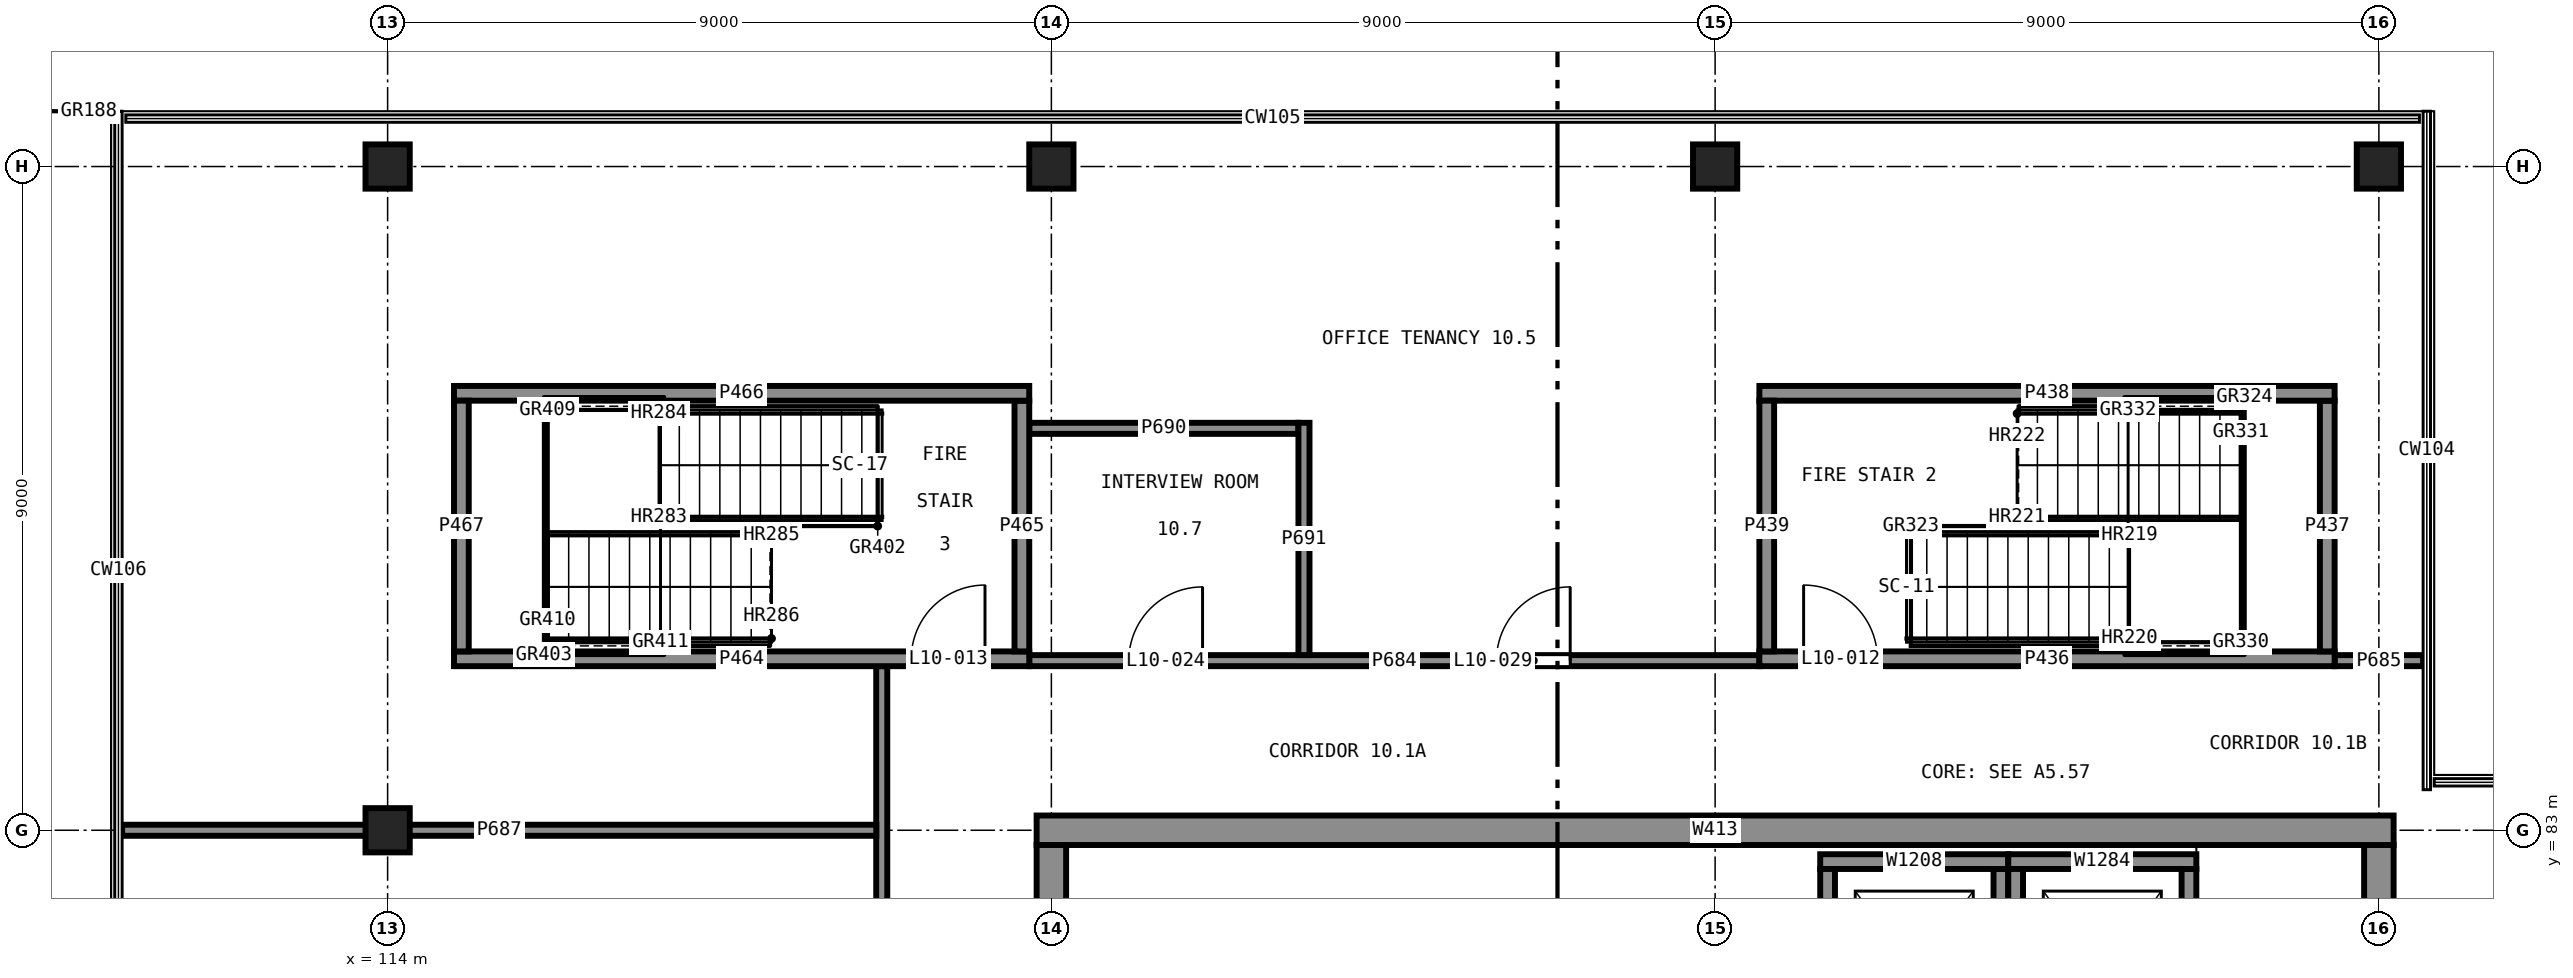
"""IFC4 building model, lengths in metres.
Left out: names, types, materials, properties, quantities, classifications, styles, units other than length and angle.
Written with IfcOpenShell. Run it as: python <this file> out.ifc"""

import sys

from ifc_helpers import new_model, si_unit, direction, frame, frame_2d, origin, origin_2d, place, context, subcontext, project, spatial, rectangle, extrude, element, fill, save


model = new_model("IFC4")
c1 = context("Model", 3, precision=1e-05, world=origin(), true_north=direction((0.0, 1.0)))
c2 = subcontext(c1, "Body", "Model", "MODEL_VIEW")
j1 = project(units=[si_unit("LENGTHUNIT", "METRE"), si_unit("PLANEANGLEUNIT", "RADIAN")], contexts=[c1])
p1 = place(None, origin())
s1 = spatial("IfcSite", under=j1, at=p1, CompositionType="ELEMENT")
p2 = place(p1, origin())
s2 = spatial("IfcBuilding", under=s1, at=p2, CompositionType="ELEMENT")
p3 = place(p2, frame((0.0, 0.0, 41.5)))
s3 = spatial("IfcBuildingStorey", under=s2, at=p3, CompositionType="ELEMENT", Elevation=41.5)
for number, where, z_axis, x_axis in (
    (1, (114.0, 83.0, 0.0), (0.0, 0.0, 1.0), (1.0, 0.0, 0.0)),
    (2, (114.0, 92.0, 0.0), (0.0, 0.0, 1.0), (1.0, 0.0, 0.0)),
    (3, (123.0, 92.0, 0.0), (0.0, 0.0, 1.0), (1.0, 0.0, 0.0)),
    (4, (132.0, 92.0, 0.0), (0.0, 0.0, 1.0), (1.0, 0.0, 0.0)),
    (5, (141.0, 92.0, 0.0), (0.0, 0.0, 1.0), (1.0, 0.0, 0.0)),
):
    element("IfcColumn", number, at=place(p3, frame(where, z_axis=z_axis, x_axis=x_axis)), inside=s3, PredefinedType="COLUMN", context=c2, shape_type="SweptSolid", body=[
        extrude(rectangle(XDim=0.6, YDim=0.6, at=origin_2d()), origin(), (0.0, 0.0, 1.0), 4.0),
    ])
p4 = place(p3, frame((141.0, 65.2, 0.0), z_axis=(0.0, 0.0, 1.0), x_axis=(0.0, 1.0, 0.0)))
e6 = element("IfcWall", 6, at=p4, inside=s3, PredefinedType="SHEAR", context=c2, shape_type="SweptSolid", body=[
    extrude(rectangle(XDim=17.6, YDim=0.4, at=frame_2d((8.8, 0.0))), origin(), (0.0, 0.0, 1.0), 4.0),
])
p5 = place(p4, frame((4.325, 0.0, 0.0)))
e7 = element("IfcOpeningElement", 7, at=p5, cuts=e6, PredefinedType="OPENING", context=c2, shape_type="SweptSolid", body=[
    extrude(rectangle(XDim=1.2, YDim=2.1, at=frame_2d((0.6, 1.05))), frame((0.0, 0.21, 0.0), z_axis=(0.0, -1.0, 0.0), x_axis=(1.0, 0.0, 0.0)), (0.0, 0.0, 1.0), 0.42),
])
p6 = place(p4, frame((12.075, 0.0, 0.0)))
e8 = element("IfcOpeningElement", 8, at=p6, cuts=e6, PredefinedType="OPENING", context=c2, shape_type="SweptSolid", body=[
    extrude(rectangle(XDim=1.2, YDim=2.1, at=frame_2d((0.6, 1.05))), frame((0.0, 0.21, 0.0), z_axis=(0.0, -1.0, 0.0), x_axis=(1.0, 0.0, 0.0)), (0.0, 0.0, 1.0), 0.42),
])
p7 = place(p3, frame((141.2, 83.0, 0.0), z_axis=(0.0, 0.0, 1.0), x_axis=(-1.0, 0.0, 0.0)))
e9 = element("IfcWall", 9, at=p7, inside=s3, PredefinedType="SHEAR", context=c2, shape_type="SweptSolid", body=[
    extrude(rectangle(XDim=18.4, YDim=0.4, at=frame_2d((9.2, 0.0))), origin(), (0.0, 0.0, 1.0), 4.0),
])
p8 = place(p3, frame((123.0, 82.8, 0.0), z_axis=(0.0, 0.0, 1.0), x_axis=(0.0, -1.0, 0.0)))
e10 = element("IfcWall", 10, at=p8, inside=s3, PredefinedType="SHEAR", context=c2, shape_type="SweptSolid", body=[
    extrude(rectangle(XDim=17.6, YDim=0.4, at=frame_2d((8.8, 0.0))), origin(), (0.0, 0.0, 1.0), 4.0),
])
p9 = place(p8, frame((12.075, 0.0, 0.0)))
e11 = element("IfcOpeningElement", 11, at=p9, cuts=e10, PredefinedType="OPENING", context=c2, shape_type="SweptSolid", body=[
    extrude(rectangle(XDim=1.2, YDim=2.1, at=frame_2d((0.6, 1.05))), frame((0.0, 0.21, 0.0), z_axis=(0.0, -1.0, 0.0), x_axis=(1.0, 0.0, 0.0)), (0.0, 0.0, 1.0), 0.42),
])
p10 = place(p8, frame((4.325, 0.0, 0.0)))
e12 = element("IfcOpeningElement", 12, at=p10, cuts=e10, PredefinedType="OPENING", context=c2, shape_type="SweptSolid", body=[
    extrude(rectangle(XDim=1.2, YDim=2.1, at=frame_2d((0.6, 1.05))), frame((0.0, 0.21, 0.0), z_axis=(0.0, -1.0, 0.0), x_axis=(1.0, 0.0, 0.0)), (0.0, 0.0, 1.0), 0.42),
])
p11 = place(p3, frame((135.875, 79.675, 0.0), z_axis=(0.0, 0.0, 1.0), x_axis=(0.0, 1.0, 0.0)))
e13 = element("IfcWall", 13, at=p11, inside=s3, PredefinedType="SHEAR", context=c2, shape_type="SweptSolid", body=[
    extrude(rectangle(XDim=2.8, YDim=0.2, at=frame_2d((1.4, 0.0))), origin(), (0.0, 0.0, 1.0), 4.0),
])
p12 = place(p3, frame((135.975, 82.575, 0.0), z_axis=(0.0, 0.0, 1.0), x_axis=(-1.0, 0.0, 0.0)))
e14 = element("IfcWall", 14, at=p12, inside=s3, PredefinedType="SHEAR", context=c2, shape_type="SweptSolid", body=[
    extrude(rectangle(XDim=2.55, YDim=0.2, at=frame_2d((1.275, 0.0))), origin(), (0.0, 0.0, 1.0), 4.0),
])
for number, where, z_axis, x_axis in (
    (15, (133.525, 82.475, 0.0), (0.0, 0.0, 1.0), (0.0, -1.0, 0.0)),
    (16, (138.425, 79.675, 0.0), (0.0, 0.0, 1.0), (0.0, 1.0, 0.0)),
):
    element("IfcWall", number, at=place(p3, frame(where, z_axis=z_axis, x_axis=x_axis)), inside=s3, PredefinedType="SHEAR", context=c2, shape_type="SweptSolid", body=[
        extrude(rectangle(XDim=2.8, YDim=0.2, at=frame_2d((1.4, 0.0))), origin(), (0.0, 0.0, 1.0), 4.0),
    ])
p13 = place(p3, frame((138.525, 82.575, 0.0), z_axis=(0.0, 0.0, 1.0), x_axis=(-1.0, 0.0, 0.0)))
e17 = element("IfcWall", 17, at=p13, inside=s3, PredefinedType="SHEAR", context=c2, shape_type="SweptSolid", body=[
    extrude(rectangle(XDim=2.55, YDim=0.2, at=frame_2d((1.275, 0.0))), origin(), (0.0, 0.0, 1.0), 4.0),
])
p14 = place(p3, frame((136.075, 82.475, 0.0), z_axis=(0.0, 0.0, 1.0), x_axis=(0.0, -1.0, 0.0)))
e18 = element("IfcWall", 18, at=p14, inside=s3, PredefinedType="SHEAR", context=c2, shape_type="SweptSolid", body=[
    extrude(rectangle(XDim=2.8, YDim=0.2, at=frame_2d((1.4, 0.0))), origin(), (0.0, 0.0, 1.0), 4.0),
])
p15 = place(p3, frame((132.6, 85.325, 0.0), z_axis=(0.0, 0.0, 1.0), x_axis=(1.0, 0.0, 0.0)))
e19 = element("IfcWall", 19, at=p15, inside=s3, PredefinedType="SHEAR", context=c2, shape_type="SweptSolid", body=[
    extrude(rectangle(XDim=7.8, YDim=0.2, at=frame_2d((3.9, 0.0))), origin(), (0.0, 0.0, 1.0), 3.75),
])
p16 = place(p15, frame((0.6, 0.0, 0.0)))
e20 = element("IfcOpeningElement", 20, at=p16, cuts=e19, PredefinedType="OPENING", context=c2, shape_type="SweptSolid", body=[
    extrude(rectangle(XDim=1.0, YDim=2.1, at=frame_2d((0.5, 1.05))), frame((0.0, 0.11, 0.0), z_axis=(0.0, -1.0, 0.0), x_axis=(1.0, 0.0, 0.0)), (0.0, 0.0, 1.0), 0.22),
])
p17 = place(p3, frame((140.3, 85.425, 0.0), z_axis=(0.0, 0.0, 1.0), x_axis=(0.0, 1.0, 0.0)))
e21 = element("IfcWall", 21, at=p17, inside=s3, PredefinedType="SHEAR", context=c2, shape_type="SweptSolid", body=[
    extrude(rectangle(XDim=3.4, YDim=0.2, at=frame_2d((1.7, 0.0))), origin(), (0.0, 0.0, 1.0), 3.75),
])
p18 = place(p3, frame((140.4, 88.925, 0.0), z_axis=(0.0, 0.0, 1.0), x_axis=(-1.0, 0.0, 0.0)))
e22 = element("IfcWall", 22, at=p18, inside=s3, PredefinedType="SHEAR", context=c2, shape_type="SweptSolid", body=[
    extrude(rectangle(XDim=7.8, YDim=0.2, at=frame_2d((3.9, 0.0))), origin(), (0.0, 0.0, 1.0), 3.75),
])
p19 = place(p3, frame((132.7, 88.825, 0.0), z_axis=(0.0, 0.0, 1.0), x_axis=(0.0, -1.0, 0.0)))
e23 = element("IfcWall", 23, at=p19, inside=s3, PredefinedType="SHEAR", context=c2, shape_type="SweptSolid", body=[
    extrude(rectangle(XDim=3.4, YDim=0.2, at=frame_2d((1.7, 0.0))), origin(), (0.0, 0.0, 1.0), 3.75),
])
p20 = place(p3, frame((114.9, 85.325, 0.0), z_axis=(0.0, 0.0, 1.0), x_axis=(1.0, 0.0, 0.0)))
e24 = element("IfcWall", 24, at=p20, inside=s3, PredefinedType="SHEAR", context=c2, shape_type="SweptSolid", body=[
    extrude(rectangle(XDim=7.8, YDim=0.2, at=frame_2d((3.9, 0.0))), origin(), (0.0, 0.0, 1.0), 3.75),
])
p21 = place(p20, frame((6.2, 0.0, 0.0)))
e25 = element("IfcOpeningElement", 25, at=p21, cuts=e24, PredefinedType="OPENING", context=c2, shape_type="SweptSolid", body=[
    extrude(rectangle(XDim=1.0, YDim=2.1, at=frame_2d((0.5, 1.05))), frame((0.0, 0.11, 0.0), z_axis=(0.0, -1.0, 0.0), x_axis=(1.0, 0.0, 0.0)), (0.0, 0.0, 1.0), 0.22),
])
p22 = place(p3, frame((122.6, 85.425, 0.0), z_axis=(0.0, 0.0, 1.0), x_axis=(0.0, 1.0, 0.0)))
e26 = element("IfcWall", 26, at=p22, inside=s3, PredefinedType="SHEAR", context=c2, shape_type="SweptSolid", body=[
    extrude(rectangle(XDim=3.4, YDim=0.2, at=frame_2d((1.7, 0.0))), origin(), (0.0, 0.0, 1.0), 3.75),
])
p23 = place(p3, frame((122.7, 88.925, 0.0), z_axis=(0.0, 0.0, 1.0), x_axis=(-1.0, 0.0, 0.0)))
e27 = element("IfcWall", 27, at=p23, inside=s3, PredefinedType="SHEAR", context=c2, shape_type="SweptSolid", body=[
    extrude(rectangle(XDim=7.8, YDim=0.2, at=frame_2d((3.9, 0.0))), origin(), (0.0, 0.0, 1.0), 3.75),
])
p24 = place(p3, frame((115.0, 88.825, 0.0), z_axis=(0.0, 0.0, 1.0), x_axis=(0.0, -1.0, 0.0)))
e28 = element("IfcWall", 28, at=p24, inside=s3, PredefinedType="SHEAR", context=c2, shape_type="SweptSolid", body=[
    extrude(rectangle(XDim=3.4, YDim=0.2, at=frame_2d((1.7, 0.0))), origin(), (0.0, 0.0, 1.0), 3.75),
])
p25 = place(p3, frame((120.7, 64.4, 0.0), z_axis=(0.0, 0.0, 1.0), x_axis=(0.0, 1.0, 0.0)))
e29 = element("IfcWall", 29, at=p25, inside=s3, PredefinedType="PARTITIONING", context=c2, shape_type="SweptSolid", body=[
    extrude(rectangle(XDim=20.825, YDim=0.15, at=frame_2d((10.413, 0.0))), origin(), (0.0, 0.0, 1.0), 3.75),
])
p26 = place(p25, frame((4.413, 0.0, 0.0)))
e30 = element("IfcOpeningElement", 30, at=p26, cuts=e29, PredefinedType="OPENING", context=c2, shape_type="SweptSolid", body=[
    extrude(rectangle(XDim=1.0, YDim=2.1, at=frame_2d((0.5, 1.05))), frame((0.0, 0.085, 0.0), z_axis=(0.0, -1.0, 0.0), x_axis=(1.0, 0.0, 0.0)), (0.0, 0.0, 1.0), 0.17),
])
p27 = place(p25, frame((13.6, 0.0, 0.0)))
e31 = element("IfcOpeningElement", 31, at=p27, cuts=e29, PredefinedType="OPENING", context=c2, shape_type="SweptSolid", body=[
    extrude(rectangle(XDim=1.0, YDim=2.1, at=frame_2d((0.5, 1.05))), frame((0.0, 0.085, 0.0), z_axis=(0.0, -1.0, 0.0), x_axis=(1.0, 0.0, 0.0)), (0.0, 0.0, 1.0), 0.17),
])
p28 = place(p3, frame((122.7, 85.3, 0.0), z_axis=(0.0, 0.0, 1.0), x_axis=(1.0, 0.0, 0.0)))
e32 = element("IfcWall", 32, at=p28, inside=s3, PredefinedType="PARTITIONING", context=c2, shape_type="SweptSolid", body=[
    extrude(rectangle(XDim=9.9, YDim=0.15, at=frame_2d((4.95, 0.0))), origin(), (0.0, 0.0, 1.0), 3.75),
])
p29 = place(p28, frame((1.35, 0.0, 0.0)))
e33 = element("IfcOpeningElement", 33, at=p29, cuts=e32, PredefinedType="OPENING", context=c2, shape_type="SweptSolid", body=[
    extrude(rectangle(XDim=1.0, YDim=2.1, at=frame_2d((0.5, 1.05))), frame((0.0, 0.085, 0.0), z_axis=(0.0, -1.0, 0.0), x_axis=(1.0, 0.0, 0.0)), (0.0, 0.0, 1.0), 0.17),
])
p30 = place(p28, frame((6.335, 0.0, 0.0)))
e34 = element("IfcOpeningElement", 34, at=p30, cuts=e32, PredefinedType="OPENING", context=c2, shape_type="SweptSolid", body=[
    extrude(rectangle(XDim=1.0, YDim=2.1, at=frame_2d((0.5, 1.05))), frame((0.0, 0.085, 0.0), z_axis=(0.0, -1.0, 0.0), x_axis=(1.0, 0.0, 0.0)), (0.0, 0.0, 1.0), 0.17),
])
p31 = place(p3, frame((140.4, 85.3, 0.0), z_axis=(0.0, 0.0, 1.0), x_axis=(1.0, 0.0, 0.0)))
e35 = element("IfcWall", 35, at=p31, inside=s3, PredefinedType="PARTITIONING", context=c2, shape_type="SweptSolid", body=[
    extrude(rectangle(XDim=1.2, YDim=0.15, at=frame_2d((0.6, 0.0))), origin(), (0.0, 0.0, 1.0), 3.75),
])
p32 = place(p3, frame((110.4, 83.0, 0.0), z_axis=(0.0, 0.0, 1.0), x_axis=(1.0, 0.0, 0.0)))
e36 = element("IfcWall", 36, at=p32, inside=s3, PredefinedType="PARTITIONING", context=c2, shape_type="SweptSolid", body=[
    extrude(rectangle(XDim=10.226, YDim=0.15, at=frame_2d((5.113, 0.0))), origin(), (0.0, 0.0, 1.0), 2.85),
])
p33 = place(p3, frame((122.7, 88.45, 0.0), z_axis=(0.0, 0.0, 1.0), x_axis=(1.0, 0.0, 0.0)))
e37 = element("IfcWall", 37, at=p33, inside=s3, PredefinedType="PARTITIONING", context=c2, shape_type="SweptSolid", body=[
    extrude(rectangle(XDim=3.65, YDim=0.15, at=frame_2d((1.825, 0.0))), origin(), (0.0, 0.0, 1.0), 3.75),
])
p34 = place(p3, frame((126.425, 85.375, 0.0), z_axis=(0.0, 0.0, 1.0), x_axis=(0.0, 1.0, 0.0)))
e38 = element("IfcWall", 38, at=p34, inside=s3, PredefinedType="PARTITIONING", context=c2, shape_type="SweptSolid", body=[
    extrude(rectangle(XDim=3.15, YDim=0.15, at=frame_2d((1.575, 0.0))), origin(), (0.0, 0.0, 1.0), 3.75),
])
p35 = place(p16, origin())
e39 = element("IfcDoor", 39, at=p35, inside=s3, OperationType="SINGLE_SWING_RIGHT", PredefinedType="DOOR", context=c2, shape_type="SweptSolid", body=[
    extrude(rectangle(XDim=1.0, YDim=2.1, at=frame_2d((0.5, 1.05))), frame((0.0, 0.025, 0.0), z_axis=(0.0, -1.0, 0.0), x_axis=(1.0, 0.0, 0.0)), (0.0, 0.0, 1.0), 0.05),
])
fill(e20, e39)
p36 = place(p21, origin())
e40 = element("IfcDoor", 40, at=p36, inside=s3, OperationType="SINGLE_SWING_LEFT", PredefinedType="DOOR", context=c2, shape_type="SweptSolid", body=[
    extrude(rectangle(XDim=1.0, YDim=2.1, at=frame_2d((0.5, 1.05))), frame((0.0, 0.025, 0.0), z_axis=(0.0, -1.0, 0.0), x_axis=(1.0, 0.0, 0.0)), (0.0, 0.0, 1.0), 0.05),
])
fill(e25, e40)
p37 = place(p29, origin())
e41 = element("IfcDoor", 41, at=p37, inside=s3, OperationType="SINGLE_SWING_LEFT", PredefinedType="DOOR", context=c2, shape_type="SweptSolid", body=[
    extrude(rectangle(XDim=1.0, YDim=2.1, at=frame_2d((0.5, 1.05))), frame((0.0, 0.025, 0.0), z_axis=(0.0, -1.0, 0.0), x_axis=(1.0, 0.0, 0.0)), (0.0, 0.0, 1.0), 0.05),
])
fill(e33, e41)
p38 = place(p30, origin())
e42 = element("IfcDoor", 42, at=p38, inside=s3, OperationType="SINGLE_SWING_LEFT", PredefinedType="DOOR", context=c2, shape_type="SweptSolid", body=[
    extrude(rectangle(XDim=1.0, YDim=2.1, at=frame_2d((0.5, 1.05))), frame((0.0, 0.025, 0.0), z_axis=(0.0, -1.0, 0.0), x_axis=(1.0, 0.0, 0.0)), (0.0, 0.0, 1.0), 0.05),
])
fill(e34, e42)
save(model, sys.argv[1])
